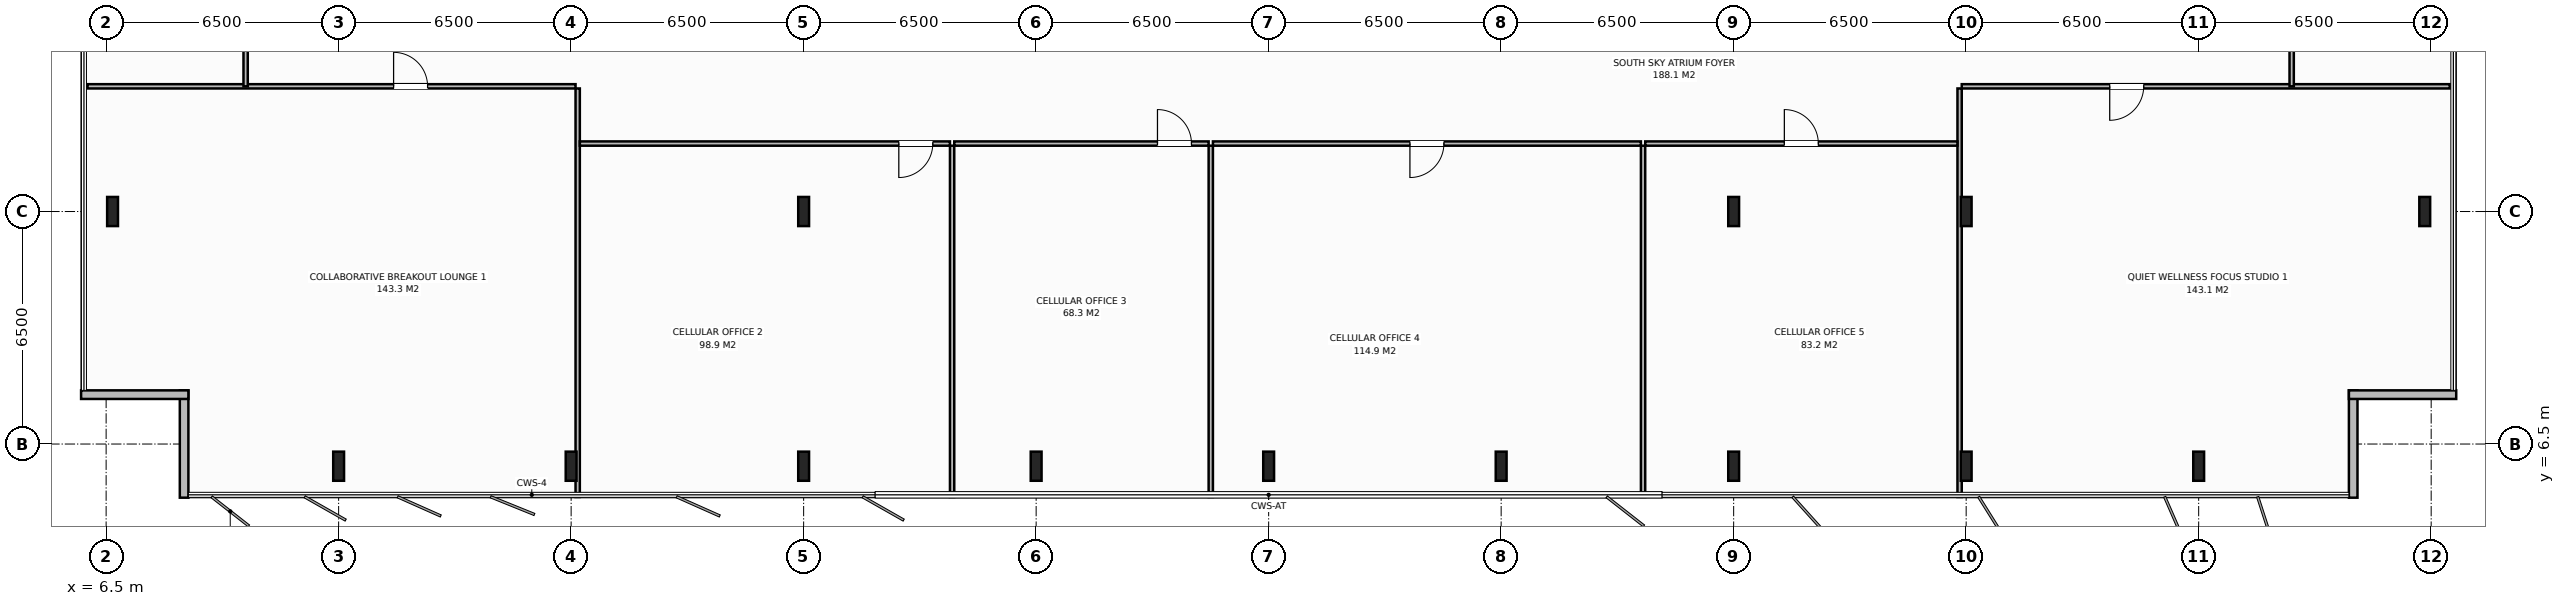
"""IFC4 building model, lengths in metres.
Left out: names, types, materials, properties, quantities, classifications, styles, units other than length and angle.
Written with IfcOpenShell. Run it as: python <this file> out.ifc"""

import sys

from ifc_helpers import new_model, si_unit, direction, frame, frame_2d, origin, origin_2d, place, context, subcontext, project, spatial, rectangle, i_section, extrude, element, fill, save


model = new_model("IFC4")
c1 = context("Model", 3, precision=1e-05, world=origin(), true_north=direction((0.0, 1.0)))
c2 = subcontext(c1, "Body", "Model", "MODEL_VIEW")
j1 = project(units=[si_unit("LENGTHUNIT", "METRE"), si_unit("PLANEANGLEUNIT", "RADIAN")], contexts=[c1])
p1 = place(None, origin())
s1 = spatial("IfcSite", under=j1, at=p1, CompositionType="ELEMENT")
p2 = place(p1, origin())
s2 = spatial("IfcBuilding", under=s1, at=p2, CompositionType="ELEMENT")
p3 = place(p2, frame((0.0, 0.0, 210.0)))
s3 = spatial("IfcBuildingStorey", under=s2, at=p3, CompositionType="ELEMENT", Elevation=210.0)
for number, where, z_axis, x_axis in (
    (1, (58.5, 13.0, 0.0), (0.0, 0.0, 1.0), (1.0, 0.0, 0.0)),
    (2, (26.0, 13.0, 0.0), (0.0, 0.0, 1.0), (1.0, 0.0, 0.0)),
    (3, (52.0, 13.0, 0.0), (0.0, 0.0, 1.0), (1.0, 0.0, 0.0)),
    (4, (13.0, 5.88, 0.0), (0.0, 0.0, 1.0), (1.0, 0.0, 0.0)),
    (5, (19.5, 5.88, 0.0), (0.0, 0.0, 1.0), (1.0, 0.0, 0.0)),
    (6, (26.0, 5.88, 0.0), (0.0, 0.0, 1.0), (1.0, 0.0, 0.0)),
    (7, (32.5, 5.88, 0.0), (0.0, 0.0, 1.0), (1.0, 0.0, 0.0)),
    (8, (39.0, 5.88, 0.0), (0.0, 0.0, 1.0), (1.0, 0.0, 0.0)),
    (9, (45.5, 5.88, 0.0), (0.0, 0.0, 1.0), (1.0, 0.0, 0.0)),
    (10, (52.0, 5.88, 0.0), (0.0, 0.0, 1.0), (1.0, 0.0, 0.0)),
    (11, (58.5, 5.88, 0.0), (0.0, 0.0, 1.0), (1.0, 0.0, 0.0)),
    (12, (65.0, 5.88, 0.0), (0.0, 0.0, 1.0), (1.0, 0.0, 0.0)),
    (13, (6.68, 13.0, 0.0), (0.0, 0.0, 1.0), (1.0, 0.0, 0.0)),
    (14, (71.32, 13.0, 0.0), (0.0, 0.0, 1.0), (1.0, 0.0, 0.0)),
):
    element("IfcColumn", number, at=place(p3, frame(where, z_axis=z_axis, x_axis=x_axis)), inside=s3, PredefinedType="COLUMN", context=c2, shape_type="SweptSolid", body=[
        extrude(i_section(OverallWidth=0.303, OverallDepth=0.814, WebThickness=0.021, FlangeThickness=0.04, at=origin_2d()), origin(), (0.0, 0.0, 1.0), 3.8),
    ])
for number, where, z_axis, x_axis in (
    (15, (8.68, 5.0, 0.0), (0.0, 0.0, 1.0), (0.0, 1.0, 0.0)),
    (16, (8.8, 7.88, 0.0), (0.0, 0.0, 1.0), (-1.0, 0.0, 0.0)),
    (17, (69.32, 8.0, 0.0), (0.0, 0.0, 1.0), (0.0, -1.0, 0.0)),
    (18, (72.2, 7.88, 0.0), (0.0, 0.0, 1.0), (-1.0, 0.0, 0.0)),
):
    element("IfcWall", number, at=place(p3, frame(where, z_axis=z_axis, x_axis=x_axis)), inside=s3, PredefinedType="STANDARD", context=c2, shape_type="SweptSolid", body=[
        extrude(rectangle(XDim=3.0, YDim=0.24, at=frame_2d((1.5, 0.0))), origin(), (0.0, 0.0, 1.0), 3.58),
    ])
p4 = place(p3, frame((19.683, 5.02, 0.0), z_axis=(0.0, 0.0, 1.0), x_axis=(0.0, 1.0, 0.0)))
e19 = element("IfcWall", 19, at=p4, inside=s3, PredefinedType="PARTITIONING", context=c2, shape_type="SweptSolid", body=[
    extrude(rectangle(XDim=11.42, YDim=0.12, at=frame_2d((5.71, 0.0))), origin(), (0.0, 0.0, 1.0), 2.88),
])
p5 = place(p3, frame((5.98, 16.5, 0.0), z_axis=(0.0, 0.0, 1.0), x_axis=(1.0, 0.0, 0.0)))
e20 = element("IfcWall", 20, at=p5, inside=s3, PredefinedType="PARTITIONING", context=c2, shape_type="SweptSolid", body=[
    extrude(rectangle(XDim=13.643, YDim=0.12, at=frame_2d((6.822, 0.0))), origin(), (0.0, 0.0, 1.0), 3.58),
])
p6 = place(p5, frame((8.557, 0.0, 0.0)))
e21 = element("IfcOpeningElement", 21, at=p6, cuts=e20, PredefinedType="OPENING", context=c2, shape_type="SweptSolid", body=[
    extrude(rectangle(XDim=0.95, YDim=2.15, at=frame_2d((0.475, 1.075))), frame((0.0, 0.07, 0.0), z_axis=(0.0, -1.0, 0.0), x_axis=(1.0, 0.0, 0.0)), (0.0, 0.0, 1.0), 0.14),
])
p7 = place(p3, frame((30.151, 5.02, 0.0), z_axis=(0.0, 0.0, 1.0), x_axis=(0.0, 1.0, 0.0)))
e22 = element("IfcWall", 22, at=p7, inside=s3, PredefinedType="PARTITIONING", context=c2, shape_type="SweptSolid", body=[
    extrude(rectangle(XDim=9.82, YDim=0.12, at=frame_2d((4.91, 0.0))), origin(), (0.0, 0.0, 1.0), 3.58),
])
p8 = place(p3, frame((19.743, 14.9, 0.0), z_axis=(0.0, 0.0, 1.0), x_axis=(1.0, 0.0, 0.0)))
e23 = element("IfcWall", 23, at=p8, inside=s3, PredefinedType="PARTITIONING", context=c2, shape_type="SweptSolid", body=[
    extrude(rectangle(XDim=10.347, YDim=0.12, at=frame_2d((5.174, 0.0))), origin(), (0.0, 0.0, 1.0), 3.58),
])
p9 = place(p8, frame((8.917, 0.0, 0.0)))
e24 = element("IfcOpeningElement", 24, at=p9, cuts=e23, PredefinedType="OPENING", context=c2, shape_type="SweptSolid", body=[
    extrude(rectangle(XDim=0.95, YDim=2.15, at=frame_2d((0.475, 1.075))), frame((0.0, 0.07, 0.0), z_axis=(0.0, -1.0, 0.0), x_axis=(1.0, 0.0, 0.0)), (0.0, 0.0, 1.0), 0.14),
])
p10 = place(p3, frame((37.382, 5.02, 0.0), z_axis=(0.0, 0.0, 1.0), x_axis=(0.0, 1.0, 0.0)))
e25 = element("IfcWall", 25, at=p10, inside=s3, PredefinedType="PARTITIONING", context=c2, shape_type="SweptSolid", body=[
    extrude(rectangle(XDim=9.82, YDim=0.12, at=frame_2d((4.91, 0.0))), origin(), (0.0, 0.0, 1.0), 3.58),
])
p11 = place(p3, frame((30.211, 14.9, 0.0), z_axis=(0.0, 0.0, 1.0), x_axis=(1.0, 0.0, 0.0)))
e26 = element("IfcWall", 26, at=p11, inside=s3, PredefinedType="PARTITIONING", context=c2, shape_type="SweptSolid", body=[
    extrude(rectangle(XDim=7.111, YDim=0.12, at=frame_2d((3.556, 0.0))), origin(), (0.0, 0.0, 1.0), 3.58),
])
p12 = place(p11, frame((5.681, 0.0, 0.0)))
e27 = element("IfcOpeningElement", 27, at=p12, cuts=e26, PredefinedType="OPENING", context=c2, shape_type="SweptSolid", body=[
    extrude(rectangle(XDim=0.95, YDim=2.15, at=frame_2d((0.475, 1.075))), frame((0.0, 0.07, 0.0), z_axis=(0.0, -1.0, 0.0), x_axis=(1.0, 0.0, 0.0)), (0.0, 0.0, 1.0), 0.14),
])
p13 = place(p3, frame((49.467, 5.02, 0.0), z_axis=(0.0, 0.0, 1.0), x_axis=(0.0, 1.0, 0.0)))
e28 = element("IfcWall", 28, at=p13, inside=s3, PredefinedType="PARTITIONING", context=c2, shape_type="SweptSolid", body=[
    extrude(rectangle(XDim=9.82, YDim=0.12, at=frame_2d((4.91, 0.0))), origin(), (0.0, 0.0, 1.0), 3.58),
])
p14 = place(p3, frame((37.442, 14.9, 0.0), z_axis=(0.0, 0.0, 1.0), x_axis=(1.0, 0.0, 0.0)))
e29 = element("IfcWall", 29, at=p14, inside=s3, PredefinedType="PARTITIONING", context=c2, shape_type="SweptSolid", body=[
    extrude(rectangle(XDim=11.965, YDim=0.12, at=frame_2d((5.983, 0.0))), origin(), (0.0, 0.0, 1.0), 3.58),
])
p15 = place(p14, frame((5.508, 0.0, 0.0)))
e30 = element("IfcOpeningElement", 30, at=p15, cuts=e29, PredefinedType="OPENING", context=c2, shape_type="SweptSolid", body=[
    extrude(rectangle(XDim=0.95, YDim=2.15, at=frame_2d((0.475, 1.075))), frame((0.0, 0.07, 0.0), z_axis=(0.0, -1.0, 0.0), x_axis=(1.0, 0.0, 0.0)), (0.0, 0.0, 1.0), 0.14),
])
p16 = place(p3, frame((58.317, 5.02, 0.0), z_axis=(0.0, 0.0, 1.0), x_axis=(0.0, 1.0, 0.0)))
e31 = element("IfcWall", 31, at=p16, inside=s3, PredefinedType="PARTITIONING", context=c2, shape_type="SweptSolid", body=[
    extrude(rectangle(XDim=11.42, YDim=0.12, at=frame_2d((5.71, 0.0))), origin(), (0.0, 0.0, 1.0), 2.88),
])
p17 = place(p3, frame((49.527, 14.9, 0.0), z_axis=(0.0, 0.0, 1.0), x_axis=(1.0, 0.0, 0.0)))
e32 = element("IfcWall", 32, at=p17, inside=s3, PredefinedType="PARTITIONING", context=c2, shape_type="SweptSolid", body=[
    extrude(rectangle(XDim=8.729, YDim=0.12, at=frame_2d((4.365, 0.0))), origin(), (0.0, 0.0, 1.0), 3.58),
])
p18 = place(p17, frame((3.89, 0.0, 0.0)))
e33 = element("IfcOpeningElement", 33, at=p18, cuts=e32, PredefinedType="OPENING", context=c2, shape_type="SweptSolid", body=[
    extrude(rectangle(XDim=0.95, YDim=2.15, at=frame_2d((0.475, 1.075))), frame((0.0, 0.07, 0.0), z_axis=(0.0, -1.0, 0.0), x_axis=(1.0, 0.0, 0.0)), (0.0, 0.0, 1.0), 0.14),
])
p19 = place(p3, frame((58.377, 16.5, 0.0), z_axis=(0.0, 0.0, 1.0), x_axis=(1.0, 0.0, 0.0)))
e34 = element("IfcWall", 34, at=p19, inside=s3, PredefinedType="PARTITIONING", context=c2, shape_type="SweptSolid", body=[
    extrude(rectangle(XDim=13.643, YDim=0.12, at=frame_2d((6.822, 0.0))), origin(), (0.0, 0.0, 1.0), 3.58),
])
p20 = place(p19, frame((4.137, 0.0, 0.0)))
e35 = element("IfcOpeningElement", 35, at=p20, cuts=e34, PredefinedType="OPENING", context=c2, shape_type="SweptSolid", body=[
    extrude(rectangle(XDim=0.95, YDim=2.15, at=frame_2d((0.475, 1.075))), frame((0.0, 0.07, 0.0), z_axis=(0.0, -1.0, 0.0), x_axis=(1.0, 0.0, 0.0)), (0.0, 0.0, 1.0), 0.14),
])
p21 = place(p3, frame((10.4, 16.5, 0.0), z_axis=(0.0, 0.0, 1.0), x_axis=(0.0, 1.0, 0.0)))
e36 = element("IfcWall", 36, at=p21, inside=s3, PredefinedType="PARTITIONING", context=c2, shape_type="SweptSolid", body=[
    extrude(rectangle(XDim=19.0, YDim=0.12, at=frame_2d((9.5, 0.0))), origin(), (0.0, 0.0, 1.0), 3.58),
])
p22 = place(p21, frame((9.025, 0.0, 0.0)))
e37 = element("IfcOpeningElement", 37, at=p22, cuts=e36, PredefinedType="OPENING", context=c2, shape_type="SweptSolid", body=[
    extrude(rectangle(XDim=0.95, YDim=2.15, at=frame_2d((0.475, 1.075))), frame((0.0, 0.07, 0.0), z_axis=(0.0, -1.0, 0.0), x_axis=(1.0, 0.0, 0.0)), (0.0, 0.0, 1.0), 0.14),
])
p23 = place(p3, frame((67.6, 16.5, 0.0), z_axis=(0.0, 0.0, 1.0), x_axis=(0.0, 1.0, 0.0)))
e38 = element("IfcWall", 38, at=p23, inside=s3, PredefinedType="PARTITIONING", context=c2, shape_type="SweptSolid", body=[
    extrude(rectangle(XDim=9.5, YDim=0.12, at=frame_2d((4.75, 0.0))), origin(), (0.0, 0.0, 1.0), 3.58),
])
p24 = place(p23, frame((5.325, 0.0, 0.0)))
e39 = element("IfcOpeningElement", 39, at=p24, cuts=e38, PredefinedType="OPENING", context=c2, shape_type="SweptSolid", body=[
    extrude(rectangle(XDim=0.95, YDim=2.15, at=frame_2d((0.475, 1.075))), frame((0.0, 0.07, 0.0), z_axis=(0.0, -1.0, 0.0), x_axis=(1.0, 0.0, 0.0)), (0.0, 0.0, 1.0), 0.14),
])
p25 = place(p6, origin())
e40 = element("IfcDoor", 40, at=p25, inside=s3, OperationType="SINGLE_SWING_LEFT", PredefinedType="DOOR", context=c2, shape_type="SweptSolid", body=[
    extrude(rectangle(XDim=0.95, YDim=2.15, at=frame_2d((0.475, 1.075))), frame((0.0, 0.025, 0.0), z_axis=(0.0, -1.0, 0.0), x_axis=(1.0, 0.0, 0.0)), (0.0, 0.0, 1.0), 0.05),
])
fill(e21, e40)
p26 = place(p9, origin())
e41 = element("IfcDoor", 41, at=p26, inside=s3, OperationType="SINGLE_SWING_RIGHT", PredefinedType="DOOR", context=c2, shape_type="SweptSolid", body=[
    extrude(rectangle(XDim=0.95, YDim=2.15, at=frame_2d((0.475, 1.075))), frame((0.0, 0.025, 0.0), z_axis=(0.0, -1.0, 0.0), x_axis=(1.0, 0.0, 0.0)), (0.0, 0.0, 1.0), 0.05),
])
fill(e24, e41)
p27 = place(p12, origin())
e42 = element("IfcDoor", 42, at=p27, inside=s3, OperationType="SINGLE_SWING_LEFT", PredefinedType="DOOR", context=c2, shape_type="SweptSolid", body=[
    extrude(rectangle(XDim=0.95, YDim=2.15, at=frame_2d((0.475, 1.075))), frame((0.0, 0.025, 0.0), z_axis=(0.0, -1.0, 0.0), x_axis=(1.0, 0.0, 0.0)), (0.0, 0.0, 1.0), 0.05),
])
fill(e27, e42)
p28 = place(p15, origin())
e43 = element("IfcDoor", 43, at=p28, inside=s3, OperationType="SINGLE_SWING_RIGHT", PredefinedType="DOOR", context=c2, shape_type="SweptSolid", body=[
    extrude(rectangle(XDim=0.95, YDim=2.15, at=frame_2d((0.475, 1.075))), frame((0.0, 0.025, 0.0), z_axis=(0.0, -1.0, 0.0), x_axis=(1.0, 0.0, 0.0)), (0.0, 0.0, 1.0), 0.05),
])
fill(e30, e43)
p29 = place(p18, origin())
e44 = element("IfcDoor", 44, at=p29, inside=s3, OperationType="SINGLE_SWING_LEFT", PredefinedType="DOOR", context=c2, shape_type="SweptSolid", body=[
    extrude(rectangle(XDim=0.95, YDim=2.15, at=frame_2d((0.475, 1.075))), frame((0.0, 0.025, 0.0), z_axis=(0.0, -1.0, 0.0), x_axis=(1.0, 0.0, 0.0)), (0.0, 0.0, 1.0), 0.05),
])
fill(e33, e44)
p30 = place(p20, origin())
e45 = element("IfcDoor", 45, at=p30, inside=s3, OperationType="SINGLE_SWING_RIGHT", PredefinedType="DOOR", context=c2, shape_type="SweptSolid", body=[
    extrude(rectangle(XDim=0.95, YDim=2.15, at=frame_2d((0.475, 1.075))), frame((0.0, 0.025, 0.0), z_axis=(0.0, -1.0, 0.0), x_axis=(1.0, 0.0, 0.0)), (0.0, 0.0, 1.0), 0.05),
])
fill(e35, e45)
save(model, sys.argv[1])
